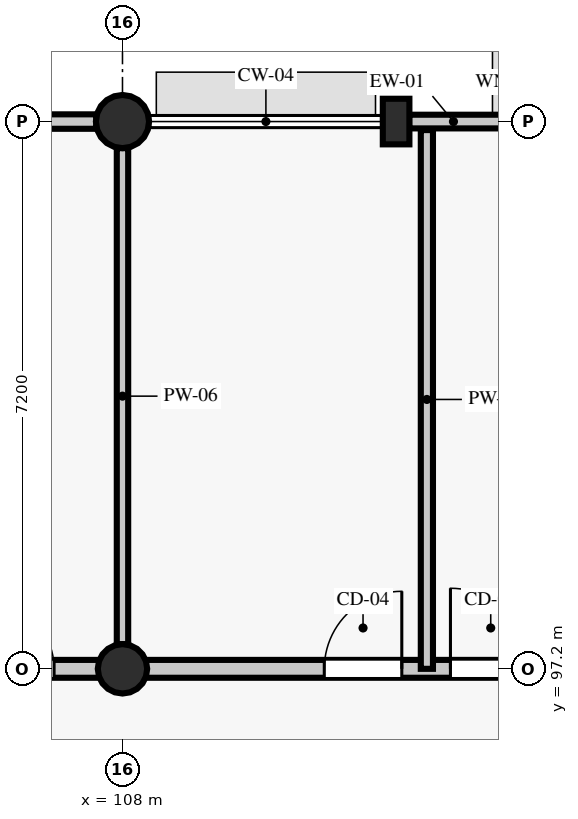
"""IFC4 building model, lengths in metres.
Left out: names, types, materials, properties, quantities, classifications, styles, units other than length and angle.
Written with IfcOpenShell. Run it as: python <this file> out.ifc"""

import sys

from ifc_helpers import new_model, si_unit, direction, frame, frame_2d, origin, origin_2d, place, context, subcontext, project, spatial, rectangle, circle, extrude, element, fill, save


model = new_model("IFC4")
c1 = context("Model", 3, precision=1e-05, world=origin(), true_north=direction((0.0, 1.0)))
c2 = subcontext(c1, "Body", "Model", "MODEL_VIEW")
j1 = project(units=[si_unit("LENGTHUNIT", "METRE"), si_unit("PLANEANGLEUNIT", "RADIAN")], contexts=[c1])
p1 = place(None, origin())
s1 = spatial("IfcSite", under=j1, at=p1, CompositionType="ELEMENT")
p2 = place(p1, origin())
s2 = spatial("IfcBuilding", under=s1, at=p2, CompositionType="ELEMENT")
p3 = place(p2, frame((0.0, 0.0, 4.8)))
s3 = spatial("IfcBuildingStorey", under=s2, at=p3, CompositionType="ELEMENT", Elevation=4.8)
p4 = place(p3, frame((108.0, 97.2, 0.0), z_axis=(0.0, 0.0, 1.0), x_axis=(1.0, 0.0, 0.0)))
e1 = element("IfcColumn", 1, at=p4, inside=s3, PredefinedType="COLUMN", context=c2, shape_type="SweptSolid", body=[
    extrude(circle(Radius=0.325, at=origin_2d()), origin(), (0.0, 0.0, 1.0), 4.53),
])
p5 = place(p3, frame((108.0, 104.4, 0.0), z_axis=(0.0, 0.0, 1.0), x_axis=(1.0, 0.0, 0.0)))
e2 = element("IfcColumn", 2, at=p5, inside=s3, PredefinedType="COLUMN", context=c2, shape_type="SweptSolid", body=[
    extrude(circle(Radius=0.35, at=origin_2d()), origin(), (0.0, 0.0, 1.0), 4.53),
])
p6 = place(p3, frame((111.6, 104.4, 0.0), z_axis=(0.0, 0.0, 1.0), x_axis=(1.0, 0.0, 0.0)))
e3 = element("IfcColumn", 3, at=p6, inside=s3, PredefinedType="PILASTER", context=c2, shape_type="SweptSolid", body=[
    extrude(rectangle(XDim=0.35, YDim=0.6, at=origin_2d()), origin(), (0.0, 0.0, 1.0), 4.53),
])
p7 = place(p3, frame((114.855, 104.4, 0.0), z_axis=(0.0, 0.0, 1.0), x_axis=(-1.0, 0.0, 0.0)))
e4 = element("IfcWall", 4, at=p7, inside=s3, PredefinedType="STANDARD", context=c2, shape_type="SweptSolid", body=[
    extrude(rectangle(XDim=3.084, YDim=0.18, at=frame_2d((1.542, 0.0))), origin(), (0.0, 0.0, 1.0), 3.88),
])
p8 = place(p7, frame((0.317, 0.0, 0.9)))
e5 = element("IfcOpeningElement", 5, at=p8, cuts=e4, PredefinedType="OPENING", context=c2, shape_type="SweptSolid", body=[
    extrude(rectangle(XDim=1.55, YDim=1.78, at=frame_2d((0.775, 0.89))), frame((0.0, 0.1, 0.0), z_axis=(0.0, -1.0, 0.0), x_axis=(1.0, 0.0, 0.0)), (0.0, 0.0, 1.0), 0.2),
])
p9 = place(p3, frame((107.655, 104.4, 0.0), z_axis=(0.0, 0.0, 1.0), x_axis=(-1.0, 0.0, 0.0)))
e6 = element("IfcWall", 6, at=p9, inside=s3, PredefinedType="STANDARD", context=c2, shape_type="SweptSolid", body=[
    extrude(rectangle(XDim=3.084, YDim=0.19, at=frame_2d((1.542, 0.0))), origin(), (0.0, 0.0, 1.0), 3.88),
])
p10 = place(p3, frame((93.95, 97.2, 0.0), z_axis=(0.0, 0.0, 1.0), x_axis=(1.0, 0.0, 0.0)))
e7 = element("IfcWall", 7, at=p10, inside=s3, PredefinedType="PARTITIONING", context=c2, shape_type="SweptSolid", body=[
    extrude(rectangle(XDim=28.1, YDim=0.235, at=frame_2d((14.05, 0.0))), origin(), (0.0, 0.0, 1.0), 3.78),
])
p11 = place(p10, frame((2.3, 0.0, 0.0)))
e8 = element("IfcOpeningElement", 8, at=p11, cuts=e7, PredefinedType="OPENING", context=c2, shape_type="SweptSolid", body=[
    extrude(rectangle(XDim=1.12, YDim=2.23, at=frame_2d((0.56, 1.115))), frame((0.0, 0.127, 0.0), z_axis=(0.0, -1.0, 0.0), x_axis=(1.0, 0.0, 0.0)), (0.0, 0.0, 1.0), 0.255),
])
p12 = place(p10, frame((4.19, 0.0, 0.0)))
e9 = element("IfcOpeningElement", 9, at=p12, cuts=e7, PredefinedType="OPENING", context=c2, shape_type="SweptSolid", body=[
    extrude(rectangle(XDim=1.2, YDim=2.23, at=frame_2d((0.6, 1.115))), frame((0.0, 0.127, 0.0), z_axis=(0.0, -1.0, 0.0), x_axis=(1.0, 0.0, 0.0)), (0.0, 0.0, 1.0), 0.255),
])
p13 = place(p10, frame((7.84, 0.0, 0.0)))
e10 = element("IfcOpeningElement", 10, at=p13, cuts=e7, PredefinedType="OPENING", context=c2, shape_type="SweptSolid", body=[
    extrude(rectangle(XDim=0.9, YDim=2.08, at=frame_2d((0.45, 1.04))), frame((0.0, 0.127, 0.0), z_axis=(0.0, -1.0, 0.0), x_axis=(1.0, 0.0, 0.0)), (0.0, 0.0, 1.0), 0.255),
])
p14 = place(p10, frame((10.01, 0.0, 0.0)))
e11 = element("IfcOpeningElement", 11, at=p14, cuts=e7, PredefinedType="OPENING", context=c2, shape_type="SweptSolid", body=[
    extrude(rectangle(XDim=0.9, YDim=2.13, at=frame_2d((0.45, 1.065))), frame((0.0, 0.127, 0.0), z_axis=(0.0, -1.0, 0.0), x_axis=(1.0, 0.0, 0.0)), (0.0, 0.0, 1.0), 0.255),
])
p15 = place(p10, frame((12.23, 0.0, 0.0)))
e12 = element("IfcOpeningElement", 12, at=p15, cuts=e7, PredefinedType="OPENING", context=c2, shape_type="SweptSolid", body=[
    extrude(rectangle(XDim=0.92, YDim=2.18, at=frame_2d((0.46, 1.09))), frame((0.0, 0.127, 0.0), z_axis=(0.0, -1.0, 0.0), x_axis=(1.0, 0.0, 0.0)), (0.0, 0.0, 1.0), 0.255),
])
p16 = place(p10, frame((16.705, 0.0, 0.0)))
e13 = element("IfcOpeningElement", 13, at=p16, cuts=e7, PredefinedType="OPENING", context=c2, shape_type="SweptSolid", body=[
    extrude(rectangle(XDim=1.02, YDim=2.08, at=frame_2d((0.51, 1.04))), frame((0.0, 0.127, 0.0), z_axis=(0.0, -1.0, 0.0), x_axis=(1.0, 0.0, 0.0)), (0.0, 0.0, 1.0), 0.255),
])
p17 = place(p10, frame((18.365, 0.0, 0.0)))
e14 = element("IfcOpeningElement", 14, at=p17, cuts=e7, PredefinedType="OPENING", context=c2, shape_type="SweptSolid", body=[
    extrude(rectangle(XDim=1.06, YDim=2.08, at=frame_2d((0.53, 1.04))), frame((0.0, 0.127, 0.0), z_axis=(0.0, -1.0, 0.0), x_axis=(1.0, 0.0, 0.0)), (0.0, 0.0, 1.0), 0.255),
])
p18 = place(p10, frame((24.513, 0.0, 0.0)))
e15 = element("IfcOpeningElement", 15, at=p18, cuts=e7, PredefinedType="OPENING", context=c2, shape_type="SweptSolid", body=[
    extrude(rectangle(XDim=1.1, YDim=2.08, at=frame_2d((0.55, 1.04))), frame((0.0, 0.127, 0.0), z_axis=(0.0, -1.0, 0.0), x_axis=(1.0, 0.0, 0.0)), (0.0, 0.0, 1.0), 0.255),
])
p19 = place(p3, frame((108.0, 97.525, 0.0), z_axis=(0.0, 0.0, 1.0), x_axis=(0.0, 1.0, 0.0)))
e16 = element("IfcWall", 16, at=p19, inside=s3, PredefinedType="PARTITIONING", context=c2, shape_type="SweptSolid", body=[
    extrude(rectangle(XDim=6.525, YDim=0.15, at=frame_2d((3.263, 0.0))), origin(), (0.0, 0.0, 1.0), 3.98),
])
p20 = place(p3, frame((112.005, 97.2, 0.0), z_axis=(0.0, 0.0, 1.0), x_axis=(0.0, 1.0, 0.0)))
e17 = element("IfcWall", 17, at=p20, inside=s3, PredefinedType="PARTITIONING", context=c2, shape_type="SweptSolid", body=[
    extrude(rectangle(XDim=7.088, YDim=0.16, at=frame_2d((3.544, 0.0))), origin(), (0.0, 0.0, 1.0), 3.78),
])
p21 = place(p15, origin())
e18 = element("IfcDoor", 18, at=p21, inside=s3, OperationType="SINGLE_SWING_LEFT", PredefinedType="DOOR", context=c2, shape_type="SweptSolid", body=[
    extrude(rectangle(XDim=0.92, YDim=2.18, at=frame_2d((0.46, 1.09))), frame((0.0, 0.025, 0.0), z_axis=(0.0, -1.0, 0.0), x_axis=(1.0, 0.0, 0.0)), (0.0, 0.0, 1.0), 0.05),
])
fill(e12, e18)
p22 = place(p16, origin())
e19 = element("IfcDoor", 19, at=p22, inside=s3, OperationType="SINGLE_SWING_RIGHT", PredefinedType="DOOR", context=c2, shape_type="SweptSolid", body=[
    extrude(rectangle(XDim=1.02, YDim=2.08, at=frame_2d((0.51, 1.04))), frame((0.0, 0.025, 0.0), z_axis=(0.0, -1.0, 0.0), x_axis=(1.0, 0.0, 0.0)), (0.0, 0.0, 1.0), 0.05),
])
fill(e13, e19)
p23 = place(p17, origin())
e20 = element("IfcDoor", 20, at=p23, inside=s3, OperationType="SINGLE_SWING_LEFT", PredefinedType="DOOR", context=c2, shape_type="SweptSolid", body=[
    extrude(rectangle(XDim=1.06, YDim=2.08, at=frame_2d((0.53, 1.04))), frame((0.0, 0.025, 0.0), z_axis=(0.0, -1.0, 0.0), x_axis=(1.0, 0.0, 0.0)), (0.0, 0.0, 1.0), 0.05),
])
fill(e14, e20)
save(model, sys.argv[1])
